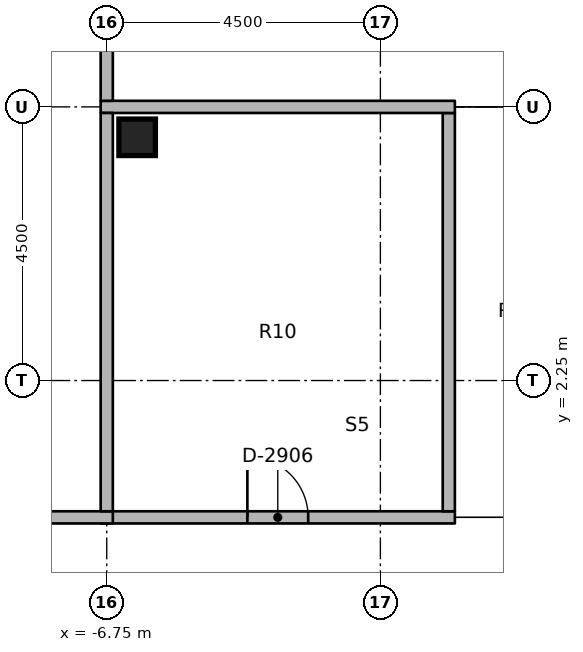
"""IFC4 building model, lengths in metres.
Left out: names, types, materials, properties, quantities, classifications, styles, units other than length and angle.
Written with IfcOpenShell. Run it as: python <this file> out.ifc"""

import sys

from ifc_helpers import new_model, si_unit, direction, frame, frame_2d, origin, origin_2d, place, context, subcontext, project, spatial, rectangle, extrude, element, fill, save


model = new_model("IFC4")
c1 = context("Model", 3, precision=1e-05, world=origin(), true_north=direction((0.0, 1.0)))
c2 = subcontext(c1, "Body", "Model", "MODEL_VIEW")
j1 = project(units=[si_unit("LENGTHUNIT", "METRE"), si_unit("PLANEANGLEUNIT", "RADIAN")], contexts=[c1])
p1 = place(None, origin())
s1 = spatial("IfcSite", under=j1, at=p1, CompositionType="ELEMENT")
p2 = place(p1, origin())
s2 = spatial("IfcBuilding", under=s1, at=p2, CompositionType="ELEMENT")
p3 = place(p2, frame((0.0, 0.0, 276.4)))
s3 = spatial("IfcBuildingStorey", under=s2, at=p3, CompositionType="ELEMENT", Elevation=276.4)
p4 = place(p3, frame((-6.25, 6.25, 0.0), z_axis=(0.0, 0.0, 1.0), x_axis=(1.0, 0.0, 0.0)))
e1 = element("IfcColumn", 1, at=p4, inside=s3, PredefinedType="COLUMN", context=c2, shape_type="SweptSolid", body=[
    extrude(rectangle(XDim=0.6, YDim=0.6, at=origin_2d()), origin(), (0.0, 0.0, 1.0), 3.65),
])
p5 = place(p3, frame((-6.85, 0.0, 0.0), z_axis=(0.0, 0.0, 1.0), x_axis=(1.0, 0.0, 0.0)))
e2 = element("IfcWall", 2, at=p5, inside=s3, PredefinedType="PARTITIONING", context=c2, shape_type="SweptSolid", body=[
    extrude(rectangle(XDim=5.825, YDim=0.2, at=frame_2d((2.913, 0.0))), origin(), (0.0, 0.0, 1.0), 2.75),
])
p6 = place(p5, frame((2.413, 0.0, 0.0)))
e3 = element("IfcOpeningElement", 3, at=p6, cuts=e2, PredefinedType="OPENING", context=c2, shape_type="SweptSolid", body=[
    extrude(rectangle(XDim=1.0, YDim=2.1, at=frame_2d((0.5, 1.05))), frame((0.0, 0.11, 0.0), z_axis=(0.0, -1.0, 0.0), x_axis=(1.0, 0.0, 0.0)), (0.0, 0.0, 1.0), 0.22),
])
p7 = place(p3, frame((-11.35, 0.0, 0.0), z_axis=(0.0, 0.0, 1.0), x_axis=(1.0, 0.0, 0.0)))
e4 = element("IfcWall", 4, at=p7, inside=s3, PredefinedType="PARTITIONING", context=c2, shape_type="SweptSolid", body=[
    extrude(rectangle(XDim=4.7, YDim=0.2, at=frame_2d((2.35, 0.0))), origin(), (0.0, 0.0, 1.0), 2.75),
])
p8 = place(p7, frame((1.85, 0.0, 0.0)))
e5 = element("IfcOpeningElement", 5, at=p8, cuts=e4, PredefinedType="OPENING", context=c2, shape_type="SweptSolid", body=[
    extrude(rectangle(XDim=1.0, YDim=2.1, at=frame_2d((0.5, 1.05))), frame((0.0, 0.11, 0.0), z_axis=(0.0, -1.0, 0.0), x_axis=(1.0, 0.0, 0.0)), (0.0, 0.0, 1.0), 0.22),
])
p9 = place(p3, frame((-1.125, 0.1, 0.0), z_axis=(0.0, 0.0, 1.0), x_axis=(0.0, 1.0, 0.0)))
e6 = element("IfcWall", 6, at=p9, inside=s3, PredefinedType="PARTITIONING", context=c2, shape_type="SweptSolid", body=[
    extrude(rectangle(XDim=6.55, YDim=0.2, at=frame_2d((3.275, 0.0))), origin(), (0.0, 0.0, 1.0), 2.75),
])
p10 = place(p3, frame((-6.85, 6.75, 0.0), z_axis=(0.0, 0.0, 1.0), x_axis=(1.0, 0.0, 0.0)))
e7 = element("IfcWall", 7, at=p10, inside=s3, PredefinedType="PARTITIONING", context=c2, shape_type="SweptSolid", body=[
    extrude(rectangle(XDim=5.825, YDim=0.2, at=frame_2d((2.913, 0.0))), origin(), (0.0, 0.0, 1.0), 2.75),
])
p11 = place(p3, frame((-6.75, 6.85, 0.0), z_axis=(0.0, 0.0, 1.0), x_axis=(0.0, 1.0, 0.0)))
e8 = element("IfcWall", 8, at=p11, inside=s3, PredefinedType="PARTITIONING", context=c2, shape_type="SweptSolid", body=[
    extrude(rectangle(XDim=3.78, YDim=0.2, at=frame_2d((1.89, 0.0))), origin(), (0.0, 0.0, 1.0), 2.75),
])
p12 = place(p3, frame((-6.75, 0.1, 0.0), z_axis=(0.0, 0.0, 1.0), x_axis=(0.0, 1.0, 0.0)))
e9 = element("IfcWall", 9, at=p12, inside=s3, PredefinedType="PARTITIONING", context=c2, shape_type="SweptSolid", body=[
    extrude(rectangle(XDim=6.55, YDim=0.2, at=frame_2d((3.275, 0.0))), origin(), (0.0, 0.0, 1.0), 2.75),
])
p13 = place(p6, origin())
e10 = element("IfcDoor", 10, at=p13, inside=s3, OperationType="SINGLE_SWING_RIGHT", PredefinedType="DOOR", context=c2, shape_type="SweptSolid", body=[
    extrude(rectangle(XDim=1.0, YDim=2.1, at=frame_2d((0.5, 1.05))), frame((0.0, 0.025, 0.0), z_axis=(0.0, -1.0, 0.0), x_axis=(1.0, 0.0, 0.0)), (0.0, 0.0, 1.0), 0.05),
])
fill(e3, e10)
save(model, sys.argv[1])
